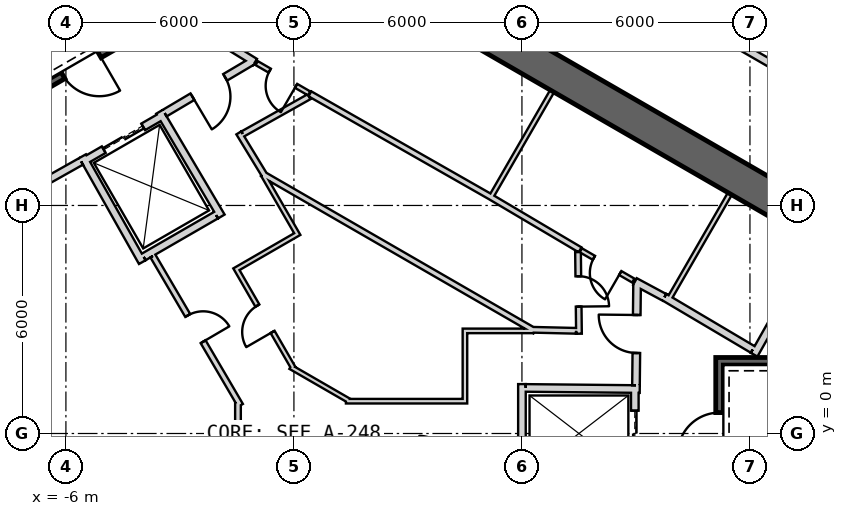
"""IFC4 building model, lengths in metres.
Left out: names, types, materials, properties, quantities, classifications, styles, units other than length and angle.
Written with IfcOpenShell. Run it as: python <this file> out.ifc"""

import sys

from ifc_helpers import new_model, si_unit, direction, frame, frame_2d, origin, place, context, subcontext, project, spatial, rectangle, extrude, element, fill, save


model = new_model("IFC4")
c1 = context("Model", 3, precision=1e-05, world=origin(), true_north=direction((0.0, 1.0)))
c2 = subcontext(c1, "Body", "Model", "MODEL_VIEW")
j1 = project(units=[si_unit("LENGTHUNIT", "METRE"), si_unit("PLANEANGLEUNIT", "RADIAN")], contexts=[c1])
p1 = place(None, origin())
s1 = spatial("IfcSite", under=j1, at=p1, CompositionType="ELEMENT")
p2 = place(p1, origin())
s2 = spatial("IfcBuilding", under=s1, at=p2, CompositionType="ELEMENT")
p3 = place(p2, frame((0.0, 0.0, 398.3)))
s3 = spatial("IfcBuildingStorey", under=s2, at=p3, CompositionType="ELEMENT", Elevation=398.3)
p4 = place(p3, frame((19.475, 2.208, 0.0), z_axis=(0.0, 0.0, 1.0), x_axis=(-0.866028369851, 0.499994862586, 0.0)))
e1 = element("IfcWall", 1, at=p4, inside=s3, PredefinedType="SHEAR", context=c2, shape_type="SweptSolid", body=[
    extrude(rectangle(XDim=31.523, YDim=0.9, at=frame_2d((15.762, 0.0))), origin(), (0.0, 0.0, 1.0), 6.5),
])
p5 = place(p4, frame((3.612, 0.0, 0.0)))
e2 = element("IfcOpeningElement", 2, at=p5, cuts=e1, PredefinedType="OPENING", context=c2, shape_type="SweptSolid", body=[
    extrude(rectangle(XDim=1.2, YDim=2.4, at=frame_2d((0.6, 1.2))), frame((0.0, 0.46, 0.0), z_axis=(0.0, -1.0, 0.0), x_axis=(1.0, 0.0, 0.0)), (0.0, 0.0, 1.0), 0.92),
])
p6 = place(p4, frame((26.712, 0.0, 0.0)))
e3 = element("IfcOpeningElement", 3, at=p6, cuts=e1, PredefinedType="OPENING", context=c2, shape_type="SweptSolid", body=[
    extrude(rectangle(XDim=1.2, YDim=2.4, at=frame_2d((0.6, 1.2))), frame((0.0, 0.46, 0.0), z_axis=(0.0, -1.0, 0.0), x_axis=(1.0, 0.0, 0.0)), (0.0, 0.0, 1.0), 0.92),
])
p7 = place(p3, frame((19.2, 1.9, -0.3), z_axis=(0.0, 0.0, 1.0), x_axis=(-1.0, 0.0, 0.0)))
e4 = element("IfcWall", 4, at=p7, inside=s3, PredefinedType="SHEAR", context=c2, shape_type="SweptSolid", body=[
    extrude(rectangle(XDim=8.1, YDim=0.2, at=frame_2d((4.05, 0.0))), origin(), (0.0, 0.0, 1.0), 6.5),
])
p8 = place(p3, frame((11.2, -1.8, -0.3), z_axis=(0.0, 0.0, 1.0), x_axis=(0.0, 1.0, 0.0)))
e5 = element("IfcWall", 5, at=p8, inside=s3, PredefinedType="SHEAR", context=c2, shape_type="SweptSolid", body=[
    extrude(rectangle(XDim=3.6, YDim=0.2, at=frame_2d((1.8, 0.0))), origin(), (0.0, 0.0, 1.0), 6.5),
])
p9 = place(p8, frame((1.25, 0.0, 0.3)))
e6 = element("IfcOpeningElement", 6, at=p9, cuts=e5, PredefinedType="OPENING", context=c2, shape_type="SweptSolid", body=[
    extrude(rectangle(XDim=1.1, YDim=2.1, at=frame_2d((0.55, 1.05))), frame((0.0, 0.11, 0.0), z_axis=(0.0, -1.0, 0.0), x_axis=(1.0, 0.0, 0.0)), (0.0, 0.0, 1.0), 0.22),
])
p10 = place(p3, frame((8.97, 1.2, 0.0), z_axis=(0.0, 0.0, 1.0), x_axis=(0.0, -1.0, 0.0)))
e7 = element("IfcWall", 7, at=p10, inside=s3, PredefinedType="PLUMBINGWALL", context=c2, shape_type="SweptSolid", body=[
    extrude(rectangle(XDim=2.4, YDim=0.2, at=frame_2d((1.2, 0.0))), origin(), (0.0, 0.0, 1.0), 6.2),
])
p11 = place(p10, frame((0.6, 0.0, 0.0)))
e8 = element("IfcOpeningElement", 8, at=p11, cuts=e7, PredefinedType="OPENING", context=c2, shape_type="SweptSolid", body=[
    extrude(rectangle(XDim=1.2, YDim=2.4, at=frame_2d((0.6, 1.2))), frame((0.0, 0.11, 0.0), z_axis=(0.0, -1.0, 0.0), x_axis=(1.0, 0.0, 0.0)), (0.0, 0.0, 1.0), 0.22),
])
p12 = place(p3, frame((6.0, -1.2, 0.0), z_axis=(0.0, 0.0, 1.0), x_axis=(0.0, 1.0, 0.0)))
e9 = element("IfcWall", 9, at=p12, inside=s3, PredefinedType="PLUMBINGWALL", context=c2, shape_type="SweptSolid", body=[
    extrude(rectangle(XDim=2.5, YDim=0.2, at=frame_2d((1.25, 0.0))), origin(), (0.0, 0.0, 1.0), 6.2),
])
p13 = place(p3, frame((9.1, 1.169, 0.0), z_axis=(0.0, 0.0, 1.0), x_axis=(-0.99994990606, 0.010009264196, 0.0)))
e10 = element("IfcWall", 10, at=p13, inside=s3, PredefinedType="PLUMBINGWALL", context=c2, shape_type="SweptSolid", body=[
    extrude(rectangle(XDim=3.0, YDim=0.2, at=frame_2d((1.5, 0.0))), origin(), (0.0, 0.0, 1.0), 6.2),
])
p14 = place(p3, frame((-7.159, 8.8, -0.3), z_axis=(0.0, 0.0, 1.0), x_axis=(0.866047807691, 0.499961193289, 0.0)))
e11 = element("IfcWall", 11, at=p14, inside=s3, PredefinedType="SHEAR", context=c2, shape_type="SweptSolid", body=[
    extrude(rectangle(XDim=3.6, YDim=0.2, at=frame_2d((1.8, 0.0))), origin(), (0.0, 0.0, 1.0), 6.5),
])
p15 = place(p14, frame((1.25, 0.0, 0.3)))
e12 = element("IfcOpeningElement", 12, at=p15, cuts=e11, PredefinedType="OPENING", context=c2, shape_type="SweptSolid", body=[
    extrude(rectangle(XDim=1.1, YDim=2.1, at=frame_2d((0.55, 1.05))), frame((0.0, 0.11, 0.0), z_axis=(0.0, -1.0, 0.0), x_axis=(1.0, 0.0, 0.0)), (0.0, 0.0, 1.0), 0.22),
])
p16 = place(p3, frame((-5.524, 7.168, 0.0), z_axis=(0.0, 0.0, 1.0), x_axis=(0.866024647952, 0.500001309137, 0.0)))
e13 = element("IfcWall", 13, at=p16, inside=s3, PredefinedType="PLUMBINGWALL", context=c2, shape_type="SweptSolid", body=[
    extrude(rectangle(XDim=2.4, YDim=0.2, at=frame_2d((1.2, 0.0))), origin(), (0.0, 0.0, 1.0), 6.2),
])
p17 = place(p16, frame((0.6, 0.0, 0.0)))
e14 = element("IfcOpeningElement", 14, at=p17, cuts=e13, PredefinedType="OPENING", context=c2, shape_type="SweptSolid", body=[
    extrude(rectangle(XDim=1.2, YDim=2.4, at=frame_2d((0.6, 1.2))), frame((0.0, 0.11, 0.0), z_axis=(0.0, -1.0, 0.0), x_axis=(1.0, 0.0, 0.0)), (0.0, 0.0, 1.0), 0.22),
])
p18 = place(p3, frame((-2.047, 5.746, 0.0), z_axis=(0.0, 0.0, 1.0), x_axis=(-0.86605622881, -0.499946605688, 0.0)))
e15 = element("IfcWall", 15, at=p18, inside=s3, PredefinedType="PLUMBINGWALL", context=c2, shape_type="SweptSolid", body=[
    extrude(rectangle(XDim=2.2, YDim=0.2, at=frame_2d((1.1, 0.0))), origin(), (0.0, 0.0, 1.0), 6.2),
])
p19 = place(p3, frame((-3.99, 4.509, 0.0), z_axis=(0.0, 0.0, 1.0), x_axis=(-0.491358283181, 0.870957540612, 0.0)))
e16 = element("IfcWall", 16, at=p19, inside=s3, PredefinedType="PLUMBINGWALL", context=c2, shape_type="SweptSolid", body=[
    extrude(rectangle(XDim=3.2, YDim=0.2, at=frame_2d((1.6, 0.0))), origin(), (0.0, 0.0, 1.0), 6.2),
])
p20 = place(p3, frame((-3.538, 8.465, 0.0), z_axis=(0.0, 0.0, 1.0), x_axis=(0.508616218331, -0.860993346345, 0.0)))
e17 = element("IfcWall", 17, at=p20, inside=s3, PredefinedType="PLUMBINGWALL", context=c2, shape_type="SweptSolid", body=[
    extrude(rectangle(XDim=3.2, YDim=0.2, at=frame_2d((1.6, 0.0))), origin(), (0.0, 0.0, 1.0), 6.2),
])
p21 = place(p3, frame((9.847, 3.495, 0.0), z_axis=(0.0, 0.0, 1.0), x_axis=(0.499984717929, 0.866034226713, 0.0)))
e18 = element("IfcWall", 18, at=p21, inside=s3, PredefinedType="PARTITIONING", context=c2, shape_type="SweptSolid", body=[
    extrude(rectangle(XDim=3.25, YDim=0.12, at=frame_2d((1.625, 0.0))), origin(), (0.0, 0.0, 1.0), 6.2),
])
p22 = place(p3, frame((12.11, 2.073, 0.0), z_axis=(0.0, 0.0, 1.0), x_axis=(0.49196600604, 0.870614408852, 0.0)))
e19 = element("IfcWall", 19, at=p22, inside=s3, PredefinedType="PARTITIONING", context=c2, shape_type="SweptSolid", body=[
    extrude(rectangle(XDim=3.35, YDim=0.2, at=frame_2d((1.675, 0.0))), origin(), (0.0, 0.0, 1.0), 6.2),
])
p23 = place(p22, frame((1.325, 0.0, 0.0)))
e20 = element("IfcOpeningElement", 20, at=p23, cuts=e19, PredefinedType="OPENING", context=c2, shape_type="SweptSolid", body=[
    extrude(rectangle(XDim=0.8, YDim=2.1, at=frame_2d((0.4, 1.05))), frame((0.0, 0.11, 0.0), z_axis=(0.0, -1.0, 0.0), x_axis=(1.0, 0.0, 0.0)), (0.0, 0.0, 1.0), 0.22),
])
p24 = place(p3, frame((9.75, 3.587, 0.0), z_axis=(0.0, 0.0, 1.0), x_axis=(0.860414880418, -0.509594185166, 0.0)))
e21 = element("IfcWall", 21, at=p24, inside=s3, PredefinedType="PARTITIONING", context=c2, shape_type="SweptSolid", body=[
    extrude(rectangle(XDim=2.7, YDim=0.2, at=frame_2d((1.35, 0.0))), origin(), (0.0, 0.0, 1.0), 6.2),
])
p25 = place(p3, frame((5.17, 6.195, 0.0), z_axis=(0.0, 0.0, 1.0), x_axis=(0.499984717929, 0.866034226713, 0.0)))
e22 = element("IfcWall", 22, at=p25, inside=s3, PredefinedType="PARTITIONING", context=c2, shape_type="SweptSolid", body=[
    extrude(rectangle(XDim=3.25, YDim=0.12, at=frame_2d((1.625, 0.0))), origin(), (0.0, 0.0, 1.0), 6.2),
])
p26 = place(p3, frame((8.974, 3.999, 0.0), z_axis=(0.0, 0.0, 1.0), x_axis=(0.880917147855, -0.473270513147, 0.0)))
e23 = element("IfcWall", 23, at=p26, inside=s3, PredefinedType="PARTITIONING", context=c2, shape_type="SweptSolid", body=[
    extrude(rectangle(XDim=0.878, YDim=0.2, at=frame_2d((0.439, 0.0))), origin(), (0.0, 0.0, 1.0), 6.2),
])
p27 = place(p3, frame((7.53, 4.833, 0.0), z_axis=(0.0, 0.0, 1.0), x_axis=(-0.860550523279, 0.509365091938, 0.0)))
e24 = element("IfcWall", 24, at=p27, inside=s3, PredefinedType="PLUMBINGWALL", context=c2, shape_type="SweptSolid", body=[
    extrude(rectangle(XDim=2.755, YDim=0.15, at=frame_2d((1.377, 0.0))), origin(), (0.0, 0.0, 1.0), 6.2),
])
p28 = place(p3, frame((7.55, 4.821, 0.0), z_axis=(0.0, 0.0, 1.0), x_axis=(0.866019818373, -0.500009674092, 0.0)))
e25 = element("IfcWall", 25, at=p28, inside=s3, PredefinedType="PARTITIONING", context=c2, shape_type="SweptSolid", body=[
    extrude(rectangle(XDim=1.594, YDim=0.12, at=frame_2d((0.797, 0.0))), origin(), (0.0, 0.0, 1.0), 6.2),
])
p29 = place(p28, frame((0.397, 0.0, 0.0)))
e26 = element("IfcOpeningElement", 26, at=p29, cuts=e25, PredefinedType="OPENING", context=c2, shape_type="SweptSolid", body=[
    extrude(rectangle(XDim=0.8, YDim=2.1, at=frame_2d((0.4, 1.05))), frame((0.0, 0.07, 0.0), z_axis=(0.0, -1.0, 0.0), x_axis=(1.0, 0.0, 0.0)), (0.0, 0.0, 1.0), 0.14),
])
p30 = place(p3, frame((-1.941, 10.339, 0.0), z_axis=(0.0, 0.0, 1.0), x_axis=(0.850216889117, -0.526432561171, 0.0)))
e27 = element("IfcWall", 27, at=p30, inside=s3, PredefinedType="PARTITIONING", context=c2, shape_type="SweptSolid", body=[
    extrude(rectangle(XDim=1.078, YDim=0.2, at=frame_2d((0.539, 0.0))), origin(), (0.0, 0.0, 1.0), 6.2),
])
p31 = place(p3, frame((0.42, 8.938, 0.0), z_axis=(0.0, 0.0, 1.0), x_axis=(0.868754934783, -0.495242226886, 0.0)))
e28 = element("IfcWall", 28, at=p31, inside=s3, PredefinedType="PLUMBINGWALL", context=c2, shape_type="SweptSolid", body=[
    extrude(rectangle(XDim=5.455, YDim=0.15, at=frame_2d((2.728, 0.0))), origin(), (0.0, 0.0, 1.0), 6.2),
])
p32 = place(p3, frame((-0.981, 9.746, 0.0), z_axis=(0.0, 0.0, 1.0), x_axis=(0.866019818373, -0.500009674092, 0.0)))
e29 = element("IfcWall", 29, at=p32, inside=s3, PredefinedType="PARTITIONING", context=c2, shape_type="SweptSolid", body=[
    extrude(rectangle(XDim=1.594, YDim=0.12, at=frame_2d((0.797, 0.0))), origin(), (0.0, 0.0, 1.0), 6.2),
])
p33 = place(p32, frame((0.397, 0.0, 0.0)))
e30 = element("IfcOpeningElement", 30, at=p33, cuts=e29, PredefinedType="OPENING", context=c2, shape_type="SweptSolid", body=[
    extrude(rectangle(XDim=0.8, YDim=2.1, at=frame_2d((0.4, 1.05))), frame((0.0, 0.07, 0.0), z_axis=(0.0, -1.0, 0.0), x_axis=(1.0, 0.0, 0.0)), (0.0, 0.0, 1.0), 0.14),
])
p34 = place(p3, frame((9.001, 1.27, 0.0), z_axis=(0.0, 0.0, 1.0), x_axis=(0.010723968736, 0.999942496594, 0.0)))
e31 = element("IfcWall", 31, at=p34, inside=s3, PredefinedType="PARTITIONING", context=c2, shape_type="SweptSolid", body=[
    extrude(rectangle(XDim=2.709, YDim=0.2, at=frame_2d((1.354, 0.0))), origin(), (0.0, 0.0, 1.0), 6.2),
])
p35 = place(p34, frame((0.848, 0.0, 0.0)))
e32 = element("IfcOpeningElement", 32, at=p35, cuts=e31, PredefinedType="OPENING", context=c2, shape_type="SweptSolid", body=[
    extrude(rectangle(XDim=1.0, YDim=2.1, at=frame_2d((0.5, 1.05))), frame((0.0, 0.11, 0.0), z_axis=(0.0, -1.0, 0.0), x_axis=(1.0, 0.0, 0.0)), (0.0, 0.0, 1.0), 0.22),
])
p36 = place(p3, frame((-5.6, 7.16, 0.0), z_axis=(0.0, 0.0, 1.0), x_axis=(-0.871345799774, -0.490669437825, 0.0)))
e33 = element("IfcWall", 33, at=p36, inside=s3, PredefinedType="PARTITIONING", context=c2, shape_type="SweptSolid", body=[
    extrude(rectangle(XDim=2.726, YDim=0.2, at=frame_2d((1.363, 0.0))), origin(), (0.0, 0.0, 1.0), 6.2),
])
p37 = place(p3, frame((-1.069, 9.81, 0.0), z_axis=(0.0, 0.0, 1.0), x_axis=(-0.860617791406, -0.509251428192, 0.0)))
e34 = element("IfcWall", 34, at=p37, inside=s3, PredefinedType="PARTITIONING", context=c2, shape_type="SweptSolid", body=[
    extrude(rectangle(XDim=2.709, YDim=0.2, at=frame_2d((1.354, 0.0))), origin(), (0.0, 0.0, 1.0), 6.2),
])
p38 = place(p37, frame((0.861, 0.0, 0.0)))
e35 = element("IfcOpeningElement", 35, at=p38, cuts=e34, PredefinedType="OPENING", context=c2, shape_type="SweptSolid", body=[
    extrude(rectangle(XDim=1.0, YDim=2.1, at=frame_2d((0.5, 1.05))), frame((0.0, 0.11, 0.0), z_axis=(0.0, -1.0, 0.0), x_axis=(1.0, 0.0, 0.0)), (0.0, 0.0, 1.0), 0.22),
])
p39 = place(p3, frame((-1.407, 0.74, 0.0), z_axis=(0.0, 0.0, 1.0), x_axis=(-0.505642484845, 0.862743112125, 0.0)))
e36 = element("IfcWall", 36, at=p39, inside=s3, PredefinedType="PLUMBINGWALL", context=c2, shape_type="SweptSolid", body=[
    extrude(rectangle(XDim=4.556, YDim=0.15, at=frame_2d((2.278, 0.0))), origin(), (0.0, 0.0, 1.0), 6.2),
])
p40 = place(p39, frame((1.942, 0.0, 0.0)))
e37 = element("IfcOpeningElement", 37, at=p40, cuts=e36, PredefinedType="OPENING", context=c2, shape_type="SweptSolid", body=[
    extrude(rectangle(XDim=0.8, YDim=2.1, at=frame_2d((0.4, 1.05))), frame((0.0, 0.085, 0.0), z_axis=(0.0, -1.0, 0.0), x_axis=(1.0, 0.0, 0.0)), (0.0, 0.0, 1.0), 0.17),
])
p41 = place(p3, frame((-1.472, -0.978, 0.0), z_axis=(0.0, 0.0, 1.0), x_axis=(0.0, 1.0, 0.0)))
e38 = element("IfcWall", 38, at=p41, inside=s3, PredefinedType="PLUMBINGWALL", context=c2, shape_type="SweptSolid", body=[
    extrude(rectangle(XDim=1.804, YDim=0.15, at=frame_2d((0.902, 0.0))), origin(), (0.0, 0.0, 1.0), 6.2),
])
p42 = place(p3, frame((-0.827, 6.832, 0.0), z_axis=(0.0, 0.0, 1.0), x_axis=(0.866020293397, -0.500008851346, 0.0)))
e39 = element("IfcWall", 39, at=p42, inside=s3, PredefinedType="PLUMBINGWALL", context=c2, shape_type="SweptSolid", body=[
    extrude(rectangle(XDim=8.264, YDim=0.15, at=frame_2d((4.132, 0.0))), origin(), (0.0, 0.0, 1.0), 6.2),
])
p43 = place(p3, frame((-1.451, 7.909, 0.0), z_axis=(0.0, 0.0, 1.0), x_axis=(0.520332410011, -0.853963806664, 0.0)))
e40 = element("IfcWall", 40, at=p43, inside=s3, PredefinedType="PLUMBINGWALL", context=c2, shape_type="SweptSolid", body=[
    extrude(rectangle(XDim=1.326, YDim=0.15, at=frame_2d((0.663, 0.0))), origin(), (0.0, 0.0, 1.0), 6.2),
])
p44 = place(p3, frame((0.399, 8.863, 0.0), z_axis=(0.0, 0.0, 1.0), x_axis=(-0.871829419551, -0.489809619348, 0.0)))
e41 = element("IfcWall", 41, at=p44, inside=s3, PredefinedType="PLUMBINGWALL", context=c2, shape_type="SweptSolid", body=[
    extrude(rectangle(XDim=2.002, YDim=0.15, at=frame_2d((1.001, 0.0))), origin(), (0.0, 0.0, 1.0), 6.2),
])
p45 = place(p3, frame((7.501, 2.625, 0.0), z_axis=(0.0, 0.0, 1.0), x_axis=(-0.011799927307, 0.999930378434, 0.0)))
e42 = element("IfcWall", 42, at=p45, inside=s3, PredefinedType="PLUMBINGWALL", context=c2, shape_type="SweptSolid", body=[
    extrude(rectangle(XDim=2.152, YDim=0.15, at=frame_2d((1.076, 0.0))), origin(), (0.0, 0.0, 1.0), 6.2),
])
p46 = place(p45, frame((0.713, 0.0, 0.0)))
e43 = element("IfcOpeningElement", 43, at=p46, cuts=e42, PredefinedType="OPENING", context=c2, shape_type="SweptSolid", body=[
    extrude(rectangle(XDim=0.8, YDim=2.1, at=frame_2d((0.4, 1.05))), frame((0.0, 0.085, 0.0), z_axis=(0.0, -1.0, 0.0), x_axis=(1.0, 0.0, 0.0)), (0.0, 0.0, 1.0), 0.17),
])
p47 = place(p3, frame((6.249, 2.729, 0.0), z_axis=(0.0, 0.0, 1.0), x_axis=(0.999719957279, -0.023664467427, 0.0)))
e44 = element("IfcWall", 44, at=p47, inside=s3, PredefinedType="PLUMBINGWALL", context=c2, shape_type="SweptSolid", body=[
    extrude(rectangle(XDim=1.176, YDim=0.15, at=frame_2d((0.588, 0.0))), origin(), (0.0, 0.0, 1.0), 6.2),
])
p48 = place(p3, frame((4.44, 2.7, 0.0), z_axis=(0.0, 0.0, 1.0), x_axis=(1.0, 0.0, 0.0)))
e45 = element("IfcWall", 45, at=p48, inside=s3, PredefinedType="PARTITIONING", context=c2, shape_type="SweptSolid", body=[
    extrude(rectangle(XDim=1.86, YDim=0.12, at=frame_2d((0.93, 0.0))), origin(), (0.0, 0.0, 1.0), 6.2),
])
p49 = place(p3, frame((4.5, 0.79, 0.0), z_axis=(0.0, 0.0, 1.0), x_axis=(0.0, 1.0, 0.0)))
e46 = element("IfcWall", 46, at=p49, inside=s3, PredefinedType="PARTITIONING", context=c2, shape_type="SweptSolid", body=[
    extrude(rectangle(XDim=1.85, YDim=0.12, at=frame_2d((0.925, 0.0))), origin(), (0.0, 0.0, 1.0), 6.2),
])
p50 = place(p3, frame((1.368, 0.85, 0.0), z_axis=(0.0, 0.0, 1.0), x_axis=(1.0, 0.0, 0.0)))
e47 = element("IfcWall", 47, at=p50, inside=s3, PredefinedType="PARTITIONING", context=c2, shape_type="SweptSolid", body=[
    extrude(rectangle(XDim=3.072, YDim=0.12, at=frame_2d((1.536, 0.0))), origin(), (0.0, 0.0, 1.0), 6.2),
])
p51 = place(p3, frame((-0.09, 1.752, 0.0), z_axis=(0.0, 0.0, 1.0), x_axis=(0.866046676307, -0.4999631531, 0.0)))
e48 = element("IfcWall", 48, at=p51, inside=s3, PredefinedType="PARTITIONING", context=c2, shape_type="SweptSolid", body=[
    extrude(rectangle(XDim=1.785, YDim=0.12, at=frame_2d((0.893, 0.0))), origin(), (0.0, 0.0, 1.0), 6.2),
])
p52 = place(p3, frame((-1.544, 4.374, 0.0), z_axis=(0.0, 0.0, 1.0), x_axis=(0.500023124857, -0.86601205223, 0.0)))
e49 = element("IfcWall", 49, at=p52, inside=s3, PredefinedType="PARTITIONING", context=c2, shape_type="SweptSolid", body=[
    extrude(rectangle(XDim=3.069, YDim=0.12, at=frame_2d((1.535, 0.0))), origin(), (0.0, 0.0, 1.0), 6.2),
])
p53 = place(p52, frame((1.165, 0.0, 0.0)))
e50 = element("IfcOpeningElement", 50, at=p53, cuts=e49, PredefinedType="OPENING", context=c2, shape_type="SweptSolid", body=[
    extrude(rectangle(XDim=0.8, YDim=2.1, at=frame_2d((0.4, 1.05))), frame((0.0, 0.07, 0.0), z_axis=(0.0, -1.0, 0.0), x_axis=(1.0, 0.0, 0.0)), (0.0, 0.0, 1.0), 0.14),
])
p54 = place(p3, frame((0.14, 5.277, 0.0), z_axis=(0.0, 0.0, 1.0), x_axis=(-0.866000971088, -0.500042316284, 0.0)))
e51 = element("IfcWall", 51, at=p54, inside=s3, PredefinedType="PARTITIONING", context=c2, shape_type="SweptSolid", body=[
    extrude(rectangle(XDim=1.85, YDim=0.12, at=frame_2d((0.925, 0.0))), origin(), (0.0, 0.0, 1.0), 6.2),
])
p55 = place(p3, frame((-0.812, 6.806, 0.0), z_axis=(0.0, 0.0, 1.0), x_axis=(0.500046227757, -0.865998712531, 0.0)))
e52 = element("IfcWall", 52, at=p55, inside=s3, PredefinedType="PARTITIONING", context=c2, shape_type="SweptSolid", body=[
    extrude(rectangle(XDim=1.74, YDim=0.12, at=frame_2d((0.87, 0.0))), origin(), (0.0, 0.0, 1.0), 6.2),
])
p56 = place(p3, frame((21.552, 4.531, 0.0), z_axis=(0.0, 0.0, 1.0), x_axis=(-0.86602469383, 0.500001229675, 0.0)))
e53 = element("IfcWall", 53, at=p56, inside=s3, PredefinedType="PARTITIONING", context=c2, shape_type="SweptSolid", body=[
    extrude(rectangle(XDim=15.97, YDim=0.2, at=frame_2d((7.985, 0.0))), origin(), (0.0, 0.0, 1.0), 5.57),
])
p57 = place(p56, frame((7.5, 0.0, 0.0)))
e54 = element("IfcOpeningElement", 54, at=p57, cuts=e53, PredefinedType="OPENING", context=c2, shape_type="SweptSolid", body=[
    extrude(rectangle(XDim=1.0, YDim=2.1, at=frame_2d((0.5, 1.05))), frame((0.0, 0.11, 0.0), z_axis=(0.0, -1.0, 0.0), x_axis=(1.0, 0.0, 0.0)), (0.0, 0.0, 1.0), 0.22),
])
p58 = place(p9, origin())
e55 = element("IfcDoor", 55, at=p58, inside=s3, OperationType="SINGLE_SWING_LEFT", PredefinedType="USERDEFINED", context=c2, shape_type="SweptSolid", body=[
    extrude(rectangle(XDim=1.1, YDim=2.1, at=frame_2d((0.55, 1.05))), frame((0.0, 0.025, 0.0), z_axis=(0.0, -1.0, 0.0), x_axis=(1.0, 0.0, 0.0)), (0.0, 0.0, 1.0), 0.05),
])
fill(e6, e55)
p59 = place(p35, origin())
e56 = element("IfcDoor", 56, at=p59, inside=s3, OperationType="SINGLE_SWING_RIGHT", PredefinedType="USERDEFINED", context=c2, shape_type="SweptSolid", body=[
    extrude(rectangle(XDim=1.0, YDim=2.1, at=frame_2d((0.5, 1.05))), frame((0.0, 0.025, 0.0), z_axis=(0.0, -1.0, 0.0), x_axis=(1.0, 0.0, 0.0)), (0.0, 0.0, 1.0), 0.05),
])
fill(e32, e56)
p60 = place(p11, origin())
e57 = element("IfcDoor", 57, at=p60, inside=s3, OperationType="SLIDING_TO_LEFT", PredefinedType="USERDEFINED", context=c2, shape_type="SweptSolid", body=[
    extrude(rectangle(XDim=1.2, YDim=2.4, at=frame_2d((0.6, 1.2))), frame((0.0, 0.025, 0.0), z_axis=(0.0, -1.0, 0.0), x_axis=(1.0, 0.0, 0.0)), (0.0, 0.0, 1.0), 0.05),
])
fill(e8, e57)
p61 = place(p15, origin())
e58 = element("IfcDoor", 58, at=p61, inside=s3, OperationType="SINGLE_SWING_RIGHT", PredefinedType="USERDEFINED", context=c2, shape_type="SweptSolid", body=[
    extrude(rectangle(XDim=1.1, YDim=2.1, at=frame_2d((0.55, 1.05))), frame((0.0, 0.025, 0.0), z_axis=(0.0, -1.0, 0.0), x_axis=(1.0, 0.0, 0.0)), (0.0, 0.0, 1.0), 0.05),
])
fill(e12, e58)
p62 = place(p38, origin())
e59 = element("IfcDoor", 59, at=p62, inside=s3, OperationType="SINGLE_SWING_RIGHT", PredefinedType="USERDEFINED", context=c2, shape_type="SweptSolid", body=[
    extrude(rectangle(XDim=1.0, YDim=2.1, at=frame_2d((0.5, 1.05))), frame((0.0, 0.025, 0.0), z_axis=(0.0, -1.0, 0.0), x_axis=(1.0, 0.0, 0.0)), (0.0, 0.0, 1.0), 0.05),
])
fill(e35, e59)
p63 = place(p17, origin())
e60 = element("IfcDoor", 60, at=p63, inside=s3, OperationType="SLIDING_TO_LEFT", PredefinedType="USERDEFINED", context=c2, shape_type="SweptSolid", body=[
    extrude(rectangle(XDim=1.2, YDim=2.4, at=frame_2d((0.6, 1.2))), frame((0.0, 0.025, 0.0), z_axis=(0.0, -1.0, 0.0), x_axis=(1.0, 0.0, 0.0)), (0.0, 0.0, 1.0), 0.05),
])
fill(e14, e60)
p64 = place(p40, origin())
e61 = element("IfcDoor", 61, at=p64, inside=s3, OperationType="SINGLE_SWING_LEFT", PredefinedType="USERDEFINED", context=c2, shape_type="SweptSolid", body=[
    extrude(rectangle(XDim=0.8, YDim=2.1, at=frame_2d((0.4, 1.05))), frame((0.0, 0.025, 0.0), z_axis=(0.0, -1.0, 0.0), x_axis=(1.0, 0.0, 0.0)), (0.0, 0.0, 1.0), 0.05),
])
fill(e37, e61)
p65 = place(p46, origin())
e62 = element("IfcDoor", 62, at=p65, inside=s3, OperationType="SINGLE_SWING_LEFT", PredefinedType="USERDEFINED", context=c2, shape_type="SweptSolid", body=[
    extrude(rectangle(XDim=0.8, YDim=2.1, at=frame_2d((0.4, 1.05))), frame((0.0, 0.025, 0.0), z_axis=(0.0, -1.0, 0.0), x_axis=(1.0, 0.0, 0.0)), (0.0, 0.0, 1.0), 0.05),
])
fill(e43, e62)
p66 = place(p53, origin())
e63 = element("IfcDoor", 63, at=p66, inside=s3, OperationType="SINGLE_SWING_RIGHT", PredefinedType="USERDEFINED", context=c2, shape_type="SweptSolid", body=[
    extrude(rectangle(XDim=0.8, YDim=2.1, at=frame_2d((0.4, 1.05))), frame((0.0, 0.025, 0.0), z_axis=(0.0, -1.0, 0.0), x_axis=(1.0, 0.0, 0.0)), (0.0, 0.0, 1.0), 0.05),
])
fill(e50, e63)
p67 = place(p29, origin())
e64 = element("IfcDoor", 64, at=p67, inside=s3, OperationType="SINGLE_SWING_RIGHT", PredefinedType="USERDEFINED", context=c2, shape_type="SweptSolid", body=[
    extrude(rectangle(XDim=0.8, YDim=2.1, at=frame_2d((0.4, 1.05))), frame((0.0, 0.025, 0.0), z_axis=(0.0, -1.0, 0.0), x_axis=(1.0, 0.0, 0.0)), (0.0, 0.0, 1.0), 0.05),
])
fill(e26, e64)
p68 = place(p33, origin())
e65 = element("IfcDoor", 65, at=p68, inside=s3, OperationType="SINGLE_SWING_RIGHT", PredefinedType="USERDEFINED", context=c2, shape_type="SweptSolid", body=[
    extrude(rectangle(XDim=0.8, YDim=2.1, at=frame_2d((0.4, 1.05))), frame((0.0, 0.025, 0.0), z_axis=(0.0, -1.0, 0.0), x_axis=(1.0, 0.0, 0.0)), (0.0, 0.0, 1.0), 0.05),
])
fill(e30, e65)
save(model, sys.argv[1])
